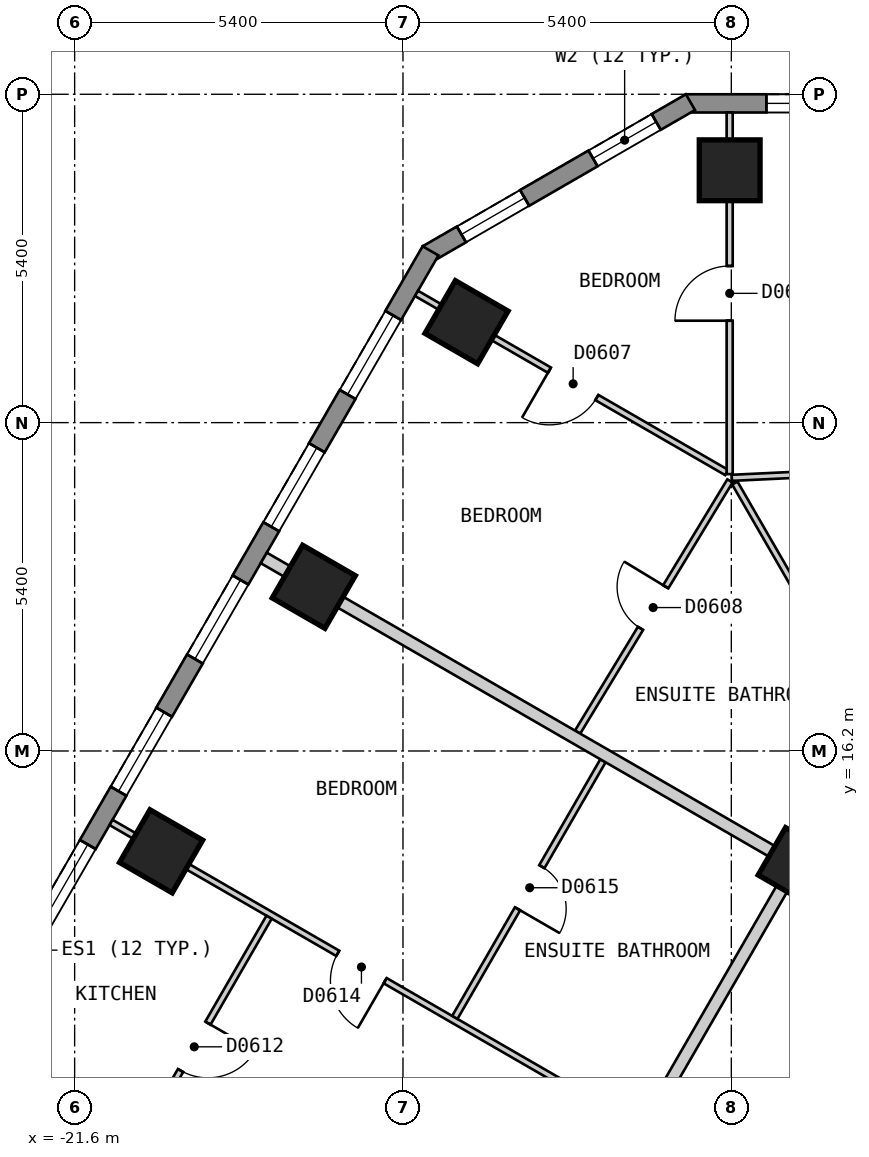
"""IFC4 building model, lengths in metres.
Left out: names, types, materials, properties, quantities, classifications, styles, units other than length and angle.
Written with IfcOpenShell. Run it as: python <this file> out.ifc"""

import sys

from ifc_helpers import new_model, si_unit, direction, frame, frame_2d, origin, origin_2d, place, context, subcontext, project, spatial, polyline, rectangle, outline, extrude, element, fill, save


model = new_model("IFC4")
c1 = context("Model", 3, precision=1e-05, world=origin(), true_north=direction((0.0, 1.0)))
c2 = subcontext(c1, "Body", "Model", "MODEL_VIEW")
j1 = project(units=[si_unit("LENGTHUNIT", "METRE"), si_unit("PLANEANGLEUNIT", "RADIAN")], contexts=[c1])
p1 = place(None, origin())
s1 = spatial("IfcSite", under=j1, at=p1, CompositionType="ELEMENT")
p2 = place(p1, origin())
s2 = spatial("IfcBuilding", under=s1, at=p2, CompositionType="ELEMENT")
p3 = place(p2, frame((0.0, 0.0, 75.0)))
s3 = spatial("IfcBuildingStorey", under=s2, at=p3, CompositionType="ELEMENT", Elevation=75.0)
for number, where, z_axis, x_axis in (
    (1, (-10.827, 25.75, 0.0), (0.0, 0.0, 1.0), (-1.0, 0.0, 0.0)),
    (2, (-15.155, 23.251, 0.0), (0.0, 0.0, 1.0), (-0.5, -0.866, 0.0)),
    (3, (-17.667, 18.9, 0.0), (0.0, 0.0, 1.0), (-0.5, -0.866, 0.0)),
    (4, (-20.178, 14.55, 0.0), (0.0, 0.0, 1.0), (-0.5, -0.866, 0.0)),
):
    element("IfcColumn", number, at=place(p3, frame(where, z_axis=z_axis, x_axis=x_axis)), inside=s3, PredefinedType="COLUMN", context=c2, shape_type="SweptSolid", body=[
        extrude(rectangle(XDim=1.0, YDim=1.0, at=origin_2d()), origin(), (0.0, 0.0, 1.0), 3.0),
    ])
p4 = place(p3, frame((-9.743, 14.325, 0.0), z_axis=(0.0, 0.0, 1.0), x_axis=(-0.5, -0.866025403784, 0.0)))
e5 = element("IfcColumn", 5, at=p4, inside=s3, PredefinedType="COLUMN", context=c2, shape_type="SweptSolid", body=[
    extrude(rectangle(XDim=0.9, YDim=0.9, at=origin_2d()), origin(), (0.0, 0.0, 1.0), 3.0),
])
p5 = place(p3, frame((11.547, 26.85, 0.0), z_axis=(0.0, 0.0, 1.0), x_axis=(-1.0, 0.0, 0.0)))
e6 = element("IfcWall", 6, at=p5, inside=s3, PredefinedType="SOLIDWALL", context=c2, shape_type="SweptSolid", body=[
    extrude(outline(polyline([(0.0, -0.15), (23.094, -0.15), (23.014, 0.15), (0.08, 0.15), (0.0, -0.15)])), origin(), (0.0, 0.0, 1.0), 2.7),
])
p6 = place(p5, frame((1.325, 0.0, 0.15)))
e7 = element("IfcOpeningElement", 7, at=p6, cuts=e6, PredefinedType="OPENING", context=c2, shape_type="SweptSolid", body=[
    extrude(rectangle(XDim=1.5, YDim=2.1, at=frame_2d((0.75, 1.05))), frame((0.0, 0.16, 0.0), z_axis=(0.0, -1.0, 0.0), x_axis=(1.0, 0.0, 0.0)), (0.0, 0.0, 1.0), 0.32),
])
p7 = place(p5, frame((4.032, 0.0, 0.15)))
e8 = element("IfcOpeningElement", 8, at=p7, cuts=e6, PredefinedType="OPENING", context=c2, shape_type="SweptSolid", body=[
    extrude(rectangle(XDim=1.5, YDim=2.1, at=frame_2d((0.75, 1.05))), frame((0.0, 0.16, 0.0), z_axis=(0.0, -1.0, 0.0), x_axis=(1.0, 0.0, 0.0)), (0.0, 0.0, 1.0), 0.32),
])
p8 = place(p5, frame((6.738, 0.0, 0.15)))
e9 = element("IfcOpeningElement", 9, at=p8, cuts=e6, PredefinedType="OPENING", context=c2, shape_type="SweptSolid", body=[
    extrude(rectangle(XDim=1.5, YDim=2.1, at=frame_2d((0.75, 1.05))), frame((0.0, 0.16, 0.0), z_axis=(0.0, -1.0, 0.0), x_axis=(1.0, 0.0, 0.0)), (0.0, 0.0, 1.0), 0.32),
])
p9 = place(p5, frame((9.445, 0.0, 0.15)))
e10 = element("IfcOpeningElement", 10, at=p9, cuts=e6, PredefinedType="OPENING", context=c2, shape_type="SweptSolid", body=[
    extrude(rectangle(XDim=1.5, YDim=2.1, at=frame_2d((0.75, 1.05))), frame((0.0, 0.16, 0.0), z_axis=(0.0, -1.0, 0.0), x_axis=(1.0, 0.0, 0.0)), (0.0, 0.0, 1.0), 0.32),
])
p10 = place(p5, frame((12.151, 0.0, 0.15)))
e11 = element("IfcOpeningElement", 11, at=p10, cuts=e6, PredefinedType="OPENING", context=c2, shape_type="SweptSolid", body=[
    extrude(rectangle(XDim=1.5, YDim=2.1, at=frame_2d((0.75, 1.05))), frame((0.0, 0.16, 0.0), z_axis=(0.0, -1.0, 0.0), x_axis=(1.0, 0.0, 0.0)), (0.0, 0.0, 1.0), 0.32),
])
p11 = place(p5, frame((14.858, 0.0, 0.15)))
e12 = element("IfcOpeningElement", 12, at=p11, cuts=e6, PredefinedType="OPENING", context=c2, shape_type="SweptSolid", body=[
    extrude(rectangle(XDim=1.5, YDim=2.1, at=frame_2d((0.75, 1.05))), frame((0.0, 0.16, 0.0), z_axis=(0.0, -1.0, 0.0), x_axis=(1.0, 0.0, 0.0)), (0.0, 0.0, 1.0), 0.32),
])
p12 = place(p5, frame((17.564, 0.0, 0.15)))
e13 = element("IfcOpeningElement", 13, at=p12, cuts=e6, PredefinedType="OPENING", context=c2, shape_type="SweptSolid", body=[
    extrude(rectangle(XDim=1.5, YDim=2.1, at=frame_2d((0.75, 1.05))), frame((0.0, 0.16, 0.0), z_axis=(0.0, -1.0, 0.0), x_axis=(1.0, 0.0, 0.0)), (0.0, 0.0, 1.0), 0.32),
])
p13 = place(p5, frame((20.271, 0.0, 0.15)))
e14 = element("IfcOpeningElement", 14, at=p13, cuts=e6, PredefinedType="OPENING", context=c2, shape_type="SweptSolid", body=[
    extrude(rectangle(XDim=1.5, YDim=2.1, at=frame_2d((0.75, 1.05))), frame((0.0, 0.16, 0.0), z_axis=(0.0, -1.0, 0.0), x_axis=(1.0, 0.0, 0.0)), (0.0, 0.0, 1.0), 0.32),
])
p14 = place(p3, frame((-11.472, 26.87, 0.0), z_axis=(0.0, 0.0, 1.0), x_axis=(-0.866022959057, -0.500004234368, 0.0)))
e15 = element("IfcWall", 15, at=p14, inside=s3, PredefinedType="SOLIDWALL", context=c2, shape_type="SweptSolid", body=[
    extrude(outline(polyline([(0.0, -0.15), (5.0, -0.15), (4.92, 0.15), (0.08, 0.15), (0.0, -0.15)])), origin(), (0.0, 0.0, 1.0), 2.7),
])
p15 = place(p14, frame((0.65, 0.0, 0.15)))
e16 = element("IfcOpeningElement", 16, at=p15, cuts=e15, PredefinedType="OPENING", context=c2, shape_type="SweptSolid", body=[
    extrude(rectangle(XDim=1.2, YDim=2.1, at=frame_2d((0.6, 1.05))), frame((0.0, 0.16, 0.0), z_axis=(0.0, -1.0, 0.0), x_axis=(1.0, 0.0, 0.0)), (0.0, 0.0, 1.0), 0.32),
])
p16 = place(p14, frame((3.149, 0.0, 0.15)))
e17 = element("IfcOpeningElement", 17, at=p16, cuts=e15, PredefinedType="OPENING", context=c2, shape_type="SweptSolid", body=[
    extrude(rectangle(XDim=1.2, YDim=2.1, at=frame_2d((0.6, 1.05))), frame((0.0, 0.16, 0.0), z_axis=(0.0, -1.0, 0.0), x_axis=(1.0, 0.0, 0.0)), (0.0, 0.0, 1.0), 0.32),
])
p17 = place(p3, frame((-15.747, 24.425, 0.0), z_axis=(0.0, 0.0, 1.0), x_axis=(-0.500027479704, -0.866009537788, 0.0)))
e18 = element("IfcWall", 18, at=p17, inside=s3, PredefinedType="SOLIDWALL", context=c2, shape_type="SweptSolid", body=[
    extrude(outline(polyline([(0.0, -0.15), (26.559, -0.15), (26.478, 0.15), (0.08, 0.15), (0.0, -0.15)])), origin(), (0.0, 0.0, 1.0), 2.7),
])
p18 = place(p17, frame((1.227, 0.0, 0.15)))
e19 = element("IfcOpeningElement", 19, at=p18, cuts=e18, PredefinedType="OPENING", context=c2, shape_type="SweptSolid", body=[
    extrude(rectangle(XDim=1.5, YDim=2.1, at=frame_2d((0.75, 1.05))), frame((0.0, 0.16, 0.0), z_axis=(0.0, -1.0, 0.0), x_axis=(1.0, 0.0, 0.0)), (0.0, 0.0, 1.0), 0.32),
])
p19 = place(p17, frame((3.739, 0.0, 0.15)))
e20 = element("IfcOpeningElement", 20, at=p19, cuts=e18, PredefinedType="OPENING", context=c2, shape_type="SweptSolid", body=[
    extrude(rectangle(XDim=1.5, YDim=2.1, at=frame_2d((0.75, 1.05))), frame((0.0, 0.16, 0.0), z_axis=(0.0, -1.0, 0.0), x_axis=(1.0, 0.0, 0.0)), (0.0, 0.0, 1.0), 0.32),
])
p20 = place(p17, frame((6.25, 0.0, 0.15)))
e21 = element("IfcOpeningElement", 21, at=p20, cuts=e18, PredefinedType="OPENING", context=c2, shape_type="SweptSolid", body=[
    extrude(rectangle(XDim=1.5, YDim=2.1, at=frame_2d((0.75, 1.05))), frame((0.0, 0.16, 0.0), z_axis=(0.0, -1.0, 0.0), x_axis=(1.0, 0.0, 0.0)), (0.0, 0.0, 1.0), 0.32),
])
p21 = place(p17, frame((8.761, 0.0, 0.15)))
e22 = element("IfcOpeningElement", 22, at=p21, cuts=e18, PredefinedType="OPENING", context=c2, shape_type="SweptSolid", body=[
    extrude(rectangle(XDim=1.5, YDim=2.1, at=frame_2d((0.75, 1.05))), frame((0.0, 0.16, 0.0), z_axis=(0.0, -1.0, 0.0), x_axis=(1.0, 0.0, 0.0)), (0.0, 0.0, 1.0), 0.32),
])
p22 = place(p17, frame((11.273, 0.0, 0.15)))
e23 = element("IfcOpeningElement", 23, at=p22, cuts=e18, PredefinedType="OPENING", context=c2, shape_type="SweptSolid", body=[
    extrude(rectangle(XDim=1.5, YDim=2.1, at=frame_2d((0.75, 1.05))), frame((0.0, 0.16, 0.0), z_axis=(0.0, -1.0, 0.0), x_axis=(1.0, 0.0, 0.0)), (0.0, 0.0, 1.0), 0.32),
])
p23 = place(p17, frame((13.785, 0.0, 0.15)))
e24 = element("IfcOpeningElement", 24, at=p23, cuts=e18, PredefinedType="OPENING", context=c2, shape_type="SweptSolid", body=[
    extrude(rectangle(XDim=1.5, YDim=2.1, at=frame_2d((0.75, 1.05))), frame((0.0, 0.16, 0.0), z_axis=(0.0, -1.0, 0.0), x_axis=(1.0, 0.0, 0.0)), (0.0, 0.0, 1.0), 0.32),
])
p24 = place(p17, frame((16.296, 0.0, 0.15)))
e25 = element("IfcOpeningElement", 25, at=p24, cuts=e18, PredefinedType="OPENING", context=c2, shape_type="SweptSolid", body=[
    extrude(rectangle(XDim=1.5, YDim=2.1, at=frame_2d((0.75, 1.05))), frame((0.0, 0.16, 0.0), z_axis=(0.0, -1.0, 0.0), x_axis=(1.0, 0.0, 0.0)), (0.0, 0.0, 1.0), 0.32),
])
p25 = place(p17, frame((18.807, 0.0, 0.15)))
e26 = element("IfcOpeningElement", 26, at=p25, cuts=e18, PredefinedType="OPENING", context=c2, shape_type="SweptSolid", body=[
    extrude(rectangle(XDim=1.5, YDim=2.1, at=frame_2d((0.75, 1.05))), frame((0.0, 0.16, 0.0), z_axis=(0.0, -1.0, 0.0), x_axis=(1.0, 0.0, 0.0)), (0.0, 0.0, 1.0), 0.32),
])
p26 = place(p17, frame((21.319, 0.0, 0.15)))
e27 = element("IfcOpeningElement", 27, at=p26, cuts=e18, PredefinedType="OPENING", context=c2, shape_type="SweptSolid", body=[
    extrude(rectangle(XDim=1.5, YDim=2.1, at=frame_2d((0.75, 1.05))), frame((0.0, 0.16, 0.0), z_axis=(0.0, -1.0, 0.0), x_axis=(1.0, 0.0, 0.0)), (0.0, 0.0, 1.0), 0.32),
])
p27 = place(p17, frame((23.831, 0.0, 0.15)))
e28 = element("IfcOpeningElement", 28, at=p27, cuts=e18, PredefinedType="OPENING", context=c2, shape_type="SweptSolid", body=[
    extrude(rectangle(XDim=1.5, YDim=2.1, at=frame_2d((0.75, 1.05))), frame((0.0, 0.16, 0.0), z_axis=(0.0, -1.0, 0.0), x_axis=(1.0, 0.0, 0.0)), (0.0, 0.0, 1.0), 0.32),
])
p28 = place(p3, frame((-18.562, -0.951, 0.0), z_axis=(0.0, 0.0, 1.0), x_axis=(0.499992962407, 0.866029466902, 0.0)))
e29 = element("IfcWall", 29, at=p28, inside=s3, PredefinedType="PARTITIONING", context=c2, shape_type="SweptSolid", body=[
    extrude(rectangle(XDim=20.208, YDim=0.2, at=frame_2d((10.104, 0.0))), origin(), (0.0, 0.0, 1.0), 2.7),
])
p29 = place(p28, frame((9.604, 0.0, 0.0)))
e30 = element("IfcOpeningElement", 30, at=p29, cuts=e29, PredefinedType="OPENING", context=c2, shape_type="SweptSolid", body=[
    extrude(rectangle(XDim=1.0, YDim=2.1, at=frame_2d((0.5, 1.05))), frame((0.0, 0.11, 0.0), z_axis=(0.0, -1.0, 0.0), x_axis=(1.0, 0.0, 0.0)), (0.0, 0.0, 1.0), 0.22),
])
p30 = place(p3, frame((-10.742, 20.606, 0.0), z_axis=(0.0, 0.0, 1.0), x_axis=(0.50003312339, -0.866006279142, 0.0)))
e31 = element("IfcWall", 31, at=p30, inside=s3, PredefinedType="PARTITIONING", context=c2, shape_type="SweptSolid", body=[
    extrude(rectangle(XDim=4.626, YDim=0.1, at=frame_2d((2.313, 0.0))), origin(), (0.0, 0.0, 1.0), 2.7),
])
p31 = place(p3, frame((-15.977, 23.725, 0.0), z_axis=(0.0, 0.0, 1.0), x_axis=(0.866028213039, -0.499995134196, 0.0)))
e32 = element("IfcWall", 32, at=p31, inside=s3, PredefinedType="PARTITIONING", context=c2, shape_type="SweptSolid", body=[
    extrude(rectangle(XDim=5.89, YDim=0.1, at=frame_2d((2.945, 0.0))), origin(), (0.0, 0.0, 1.0), 2.7),
])
p32 = place(p31, frame((2.524, 0.0, 0.0)))
e33 = element("IfcOpeningElement", 33, at=p32, cuts=e32, PredefinedType="OPENING", context=c2, shape_type="SweptSolid", body=[
    extrude(rectangle(XDim=0.9, YDim=2.1, at=frame_2d((0.45, 1.05))), frame((0.0, 0.06, 0.0), z_axis=(0.0, -1.0, 0.0), x_axis=(1.0, 0.0, 0.0)), (0.0, 0.0, 1.0), 0.12),
])
p33 = place(p3, frame((-21.001, 15.025, 0.0), z_axis=(0.0, 0.0, 1.0), x_axis=(0.866016855193, -0.500014806302, 0.0)))
e34 = element("IfcWall", 34, at=p33, inside=s3, PredefinedType="PARTITIONING", context=c2, shape_type="SweptSolid", body=[
    extrude(rectangle(XDim=10.0, YDim=0.1, at=frame_2d((5.0, 0.0))), origin(), (0.0, 0.0, 1.0), 2.7),
])
p34 = place(p33, frame((4.305, 0.0, 0.0)))
e35 = element("IfcOpeningElement", 35, at=p34, cuts=e34, PredefinedType="OPENING", context=c2, shape_type="SweptSolid", body=[
    extrude(rectangle(XDim=0.9, YDim=2.1, at=frame_2d((0.45, 1.05))), frame((0.0, 0.06, 0.0), z_axis=(0.0, -1.0, 0.0), x_axis=(1.0, 0.0, 0.0)), (0.0, 0.0, 1.0), 0.12),
])
p35 = place(p3, frame((-13.328, 16.511, 0.0), z_axis=(0.0, 0.0, 1.0), x_axis=(0.518570528669, 0.855034857065, 0.0)))
e36 = element("IfcWall", 36, at=p35, inside=s3, PredefinedType="PARTITIONING", context=c2, shape_type="SweptSolid", body=[
    extrude(rectangle(XDim=4.83, YDim=0.1, at=frame_2d((2.415, 0.0))), origin(), (0.0, 0.0, 1.0), 2.7),
])
p36 = place(p35, frame((1.995, 0.0, 0.0)))
e37 = element("IfcOpeningElement", 37, at=p36, cuts=e36, PredefinedType="OPENING", context=c2, shape_type="SweptSolid", body=[
    extrude(rectangle(XDim=0.8, YDim=2.1, at=frame_2d((0.4, 1.05))), frame((0.0, 0.06, 0.0), z_axis=(0.0, -1.0, 0.0), x_axis=(1.0, 0.0, 0.0)), (0.0, 0.0, 1.0), 0.12),
])
p37 = place(p3, frame((-15.347, 11.819, 0.0), z_axis=(0.0, 0.0, 1.0), x_axis=(0.499943653708, 0.866057932887, 0.0)))
e38 = element("IfcWall", 38, at=p37, inside=s3, PredefinedType="PARTITIONING", context=c2, shape_type="SweptSolid", body=[
    extrude(rectangle(XDim=4.873, YDim=0.1, at=frame_2d((2.436, 0.0))), origin(), (0.0, 0.0, 1.0), 2.7),
])
p38 = place(p37, frame((2.062, 0.0, 0.0)))
e39 = element("IfcOpeningElement", 39, at=p38, cuts=e38, PredefinedType="OPENING", context=c2, shape_type="SweptSolid", body=[
    extrude(rectangle(XDim=0.8, YDim=2.1, at=frame_2d((0.4, 1.05))), frame((0.0, 0.06, 0.0), z_axis=(0.0, -1.0, 0.0), x_axis=(1.0, 0.0, 0.0)), (0.0, 0.0, 1.0), 0.12),
])
p39 = place(p3, frame((-20.864, 9.203, 0.0), z_axis=(0.0, 0.0, 1.0), x_axis=(0.500000007376, 0.866025399526, 0.0)))
e40 = element("IfcWall", 40, at=p39, inside=s3, PredefinedType="PARTITIONING", context=c2, shape_type="SweptSolid", body=[
    extrude(rectangle(XDim=4.924, YDim=0.1, at=frame_2d((2.462, 0.0))), origin(), (0.0, 0.0, 1.0), 2.7),
])
p40 = place(p39, frame((2.012, 0.0, 0.0)))
e41 = element("IfcOpeningElement", 41, at=p40, cuts=e40, PredefinedType="OPENING", context=c2, shape_type="SweptSolid", body=[
    extrude(rectangle(XDim=0.9, YDim=2.1, at=frame_2d((0.45, 1.05))), frame((0.0, 0.06, 0.0), z_axis=(0.0, -1.0, 0.0), x_axis=(1.0, 0.0, 0.0)), (0.0, 0.0, 1.0), 0.12),
])
p41 = place(p3, frame((-10.827, 20.753, 0.0), z_axis=(0.0, 0.0, 1.0), x_axis=(0.0, 1.0, 0.0)))
e42 = element("IfcWall", 42, at=p41, inside=s3, PredefinedType="PARTITIONING", context=c2, shape_type="SweptSolid", body=[
    extrude(rectangle(XDim=5.947, YDim=0.1, at=frame_2d((2.974, 0.0))), origin(), (0.0, 0.0, 1.0), 2.7),
])
p42 = place(p41, frame((2.523, 0.0, 0.0)))
e43 = element("IfcOpeningElement", 43, at=p42, cuts=e42, PredefinedType="OPENING", context=c2, shape_type="SweptSolid", body=[
    extrude(rectangle(XDim=0.9, YDim=2.1, at=frame_2d((0.45, 1.05))), frame((0.0, 0.06, 0.0), z_axis=(0.0, -1.0, 0.0), x_axis=(1.0, 0.0, 0.0)), (0.0, 0.0, 1.0), 0.12),
])
p43 = place(p3, frame((-10.792, 20.692, 0.0), z_axis=(0.0, 0.0, 1.0), x_axis=(0.998861653202, 0.04770112957, 0.0)))
e44 = element("IfcWall", 44, at=p43, inside=s3, PredefinedType="PARTITIONING", context=c2, shape_type="SweptSolid", body=[
    extrude(rectangle(XDim=1.28, YDim=0.1, at=frame_2d((0.64, 0.0))), origin(), (0.0, 0.0, 1.0), 2.7),
])
p44 = place(p3, frame((-18.489, 19.375, 0.0), z_axis=(0.0, 0.0, 1.0), x_axis=(0.866016855193, -0.500014806302, 0.0)))
e45 = element("IfcWall", 45, at=p44, inside=s3, PredefinedType="PARTITIONING", context=c2, shape_type="SweptSolid", body=[
    extrude(rectangle(XDim=10.0, YDim=0.2, at=frame_2d((5.0, 0.0))), origin(), (0.0, 0.0, 1.0), 2.7),
])
p45 = place(p13, origin())
e46 = element("IfcWindow", 46, at=p45, inside=s3, PartitioningType="SINGLE_PANEL", PredefinedType="WINDOW", context=c2, shape_type="SweptSolid", body=[
    extrude(rectangle(XDim=1.5, YDim=2.1, at=frame_2d((0.75, 1.05))), frame((0.0, 0.03, 0.0), z_axis=(0.0, -1.0, 0.0), x_axis=(1.0, 0.0, 0.0)), (0.0, 0.0, 1.0), 0.06),
])
fill(e14, e46)
p46 = place(p15, origin())
e47 = element("IfcWindow", 47, at=p46, inside=s3, PartitioningType="SINGLE_PANEL", PredefinedType="WINDOW", context=c2, shape_type="SweptSolid", body=[
    extrude(rectangle(XDim=1.2, YDim=2.1, at=frame_2d((0.6, 1.05))), frame((0.0, 0.03, 0.0), z_axis=(0.0, -1.0, 0.0), x_axis=(1.0, 0.0, 0.0)), (0.0, 0.0, 1.0), 0.06),
])
fill(e16, e47)
p47 = place(p16, origin())
e48 = element("IfcWindow", 48, at=p47, inside=s3, PartitioningType="SINGLE_PANEL", PredefinedType="WINDOW", context=c2, shape_type="SweptSolid", body=[
    extrude(rectangle(XDim=1.2, YDim=2.1, at=frame_2d((0.6, 1.05))), frame((0.0, 0.03, 0.0), z_axis=(0.0, -1.0, 0.0), x_axis=(1.0, 0.0, 0.0)), (0.0, 0.0, 1.0), 0.06),
])
fill(e17, e48)
p48 = place(p18, origin())
e49 = element("IfcWindow", 49, at=p48, inside=s3, PartitioningType="SINGLE_PANEL", PredefinedType="WINDOW", context=c2, shape_type="SweptSolid", body=[
    extrude(rectangle(XDim=1.5, YDim=2.1, at=frame_2d((0.75, 1.05))), frame((0.0, 0.03, 0.0), z_axis=(0.0, -1.0, 0.0), x_axis=(1.0, 0.0, 0.0)), (0.0, 0.0, 1.0), 0.06),
])
fill(e19, e49)
p49 = place(p19, origin())
e50 = element("IfcWindow", 50, at=p49, inside=s3, PartitioningType="SINGLE_PANEL", PredefinedType="WINDOW", context=c2, shape_type="SweptSolid", body=[
    extrude(rectangle(XDim=1.5, YDim=2.1, at=frame_2d((0.75, 1.05))), frame((0.0, 0.03, 0.0), z_axis=(0.0, -1.0, 0.0), x_axis=(1.0, 0.0, 0.0)), (0.0, 0.0, 1.0), 0.06),
])
fill(e20, e50)
p50 = place(p20, origin())
e51 = element("IfcWindow", 51, at=p50, inside=s3, PartitioningType="SINGLE_PANEL", PredefinedType="WINDOW", context=c2, shape_type="SweptSolid", body=[
    extrude(rectangle(XDim=1.5, YDim=2.1, at=frame_2d((0.75, 1.05))), frame((0.0, 0.03, 0.0), z_axis=(0.0, -1.0, 0.0), x_axis=(1.0, 0.0, 0.0)), (0.0, 0.0, 1.0), 0.06),
])
fill(e21, e51)
p51 = place(p21, origin())
e52 = element("IfcWindow", 52, at=p51, inside=s3, PartitioningType="SINGLE_PANEL", PredefinedType="WINDOW", context=c2, shape_type="SweptSolid", body=[
    extrude(rectangle(XDim=1.5, YDim=2.1, at=frame_2d((0.75, 1.05))), frame((0.0, 0.03, 0.0), z_axis=(0.0, -1.0, 0.0), x_axis=(1.0, 0.0, 0.0)), (0.0, 0.0, 1.0), 0.06),
])
fill(e22, e52)
p52 = place(p22, origin())
e53 = element("IfcWindow", 53, at=p52, inside=s3, PartitioningType="SINGLE_PANEL", PredefinedType="WINDOW", context=c2, shape_type="SweptSolid", body=[
    extrude(rectangle(XDim=1.5, YDim=2.1, at=frame_2d((0.75, 1.05))), frame((0.0, 0.03, 0.0), z_axis=(0.0, -1.0, 0.0), x_axis=(1.0, 0.0, 0.0)), (0.0, 0.0, 1.0), 0.06),
])
fill(e23, e53)
p53 = place(p42, origin())
e54 = element("IfcDoor", 54, at=p53, inside=s3, OperationType="SINGLE_SWING_LEFT", PredefinedType="DOOR", context=c2, shape_type="SweptSolid", body=[
    extrude(rectangle(XDim=0.9, YDim=2.1, at=frame_2d((0.45, 1.05))), frame((0.0, 0.025, 0.0), z_axis=(0.0, -1.0, 0.0), x_axis=(1.0, 0.0, 0.0)), (0.0, 0.0, 1.0), 0.05),
])
fill(e43, e54)
p54 = place(p32, origin())
e55 = element("IfcDoor", 55, at=p54, inside=s3, OperationType="SINGLE_SWING_LEFT", PredefinedType="DOOR", context=c2, shape_type="SweptSolid", body=[
    extrude(rectangle(XDim=0.9, YDim=2.1, at=frame_2d((0.45, 1.05))), frame((0.0, 0.025, 0.0), z_axis=(0.0, -1.0, 0.0), x_axis=(1.0, 0.0, 0.0)), (0.0, 0.0, 1.0), 0.05),
])
fill(e33, e55)
p55 = place(p36, origin())
e56 = element("IfcDoor", 56, at=p55, inside=s3, OperationType="SINGLE_SWING_RIGHT", PredefinedType="DOOR", context=c2, shape_type="SweptSolid", body=[
    extrude(rectangle(XDim=0.8, YDim=2.1, at=frame_2d((0.4, 1.05))), frame((0.0, 0.025, 0.0), z_axis=(0.0, -1.0, 0.0), x_axis=(1.0, 0.0, 0.0)), (0.0, 0.0, 1.0), 0.05),
])
fill(e37, e56)
p56 = place(p40, origin())
e57 = element("IfcDoor", 57, at=p56, inside=s3, OperationType="SINGLE_SWING_RIGHT", PredefinedType="DOOR", context=c2, shape_type="SweptSolid", body=[
    extrude(rectangle(XDim=0.9, YDim=2.1, at=frame_2d((0.45, 1.05))), frame((0.0, 0.025, 0.0), z_axis=(0.0, -1.0, 0.0), x_axis=(1.0, 0.0, 0.0)), (0.0, 0.0, 1.0), 0.05),
])
fill(e41, e57)
p57 = place(p34, origin())
e58 = element("IfcDoor", 58, at=p57, inside=s3, OperationType="SINGLE_SWING_RIGHT", PredefinedType="DOOR", context=c2, shape_type="SweptSolid", body=[
    extrude(rectangle(XDim=0.9, YDim=2.1, at=frame_2d((0.45, 1.05))), frame((0.0, 0.025, 0.0), z_axis=(0.0, -1.0, 0.0), x_axis=(1.0, 0.0, 0.0)), (0.0, 0.0, 1.0), 0.05),
])
fill(e35, e58)
p58 = place(p38, origin())
e59 = element("IfcDoor", 59, at=p58, inside=s3, OperationType="SINGLE_SWING_LEFT", PredefinedType="DOOR", context=c2, shape_type="SweptSolid", body=[
    extrude(rectangle(XDim=0.8, YDim=2.1, at=frame_2d((0.4, 1.05))), frame((0.0, 0.025, 0.0), z_axis=(0.0, -1.0, 0.0), x_axis=(1.0, 0.0, 0.0)), (0.0, 0.0, 1.0), 0.05),
])
fill(e39, e59)
save(model, sys.argv[1])
